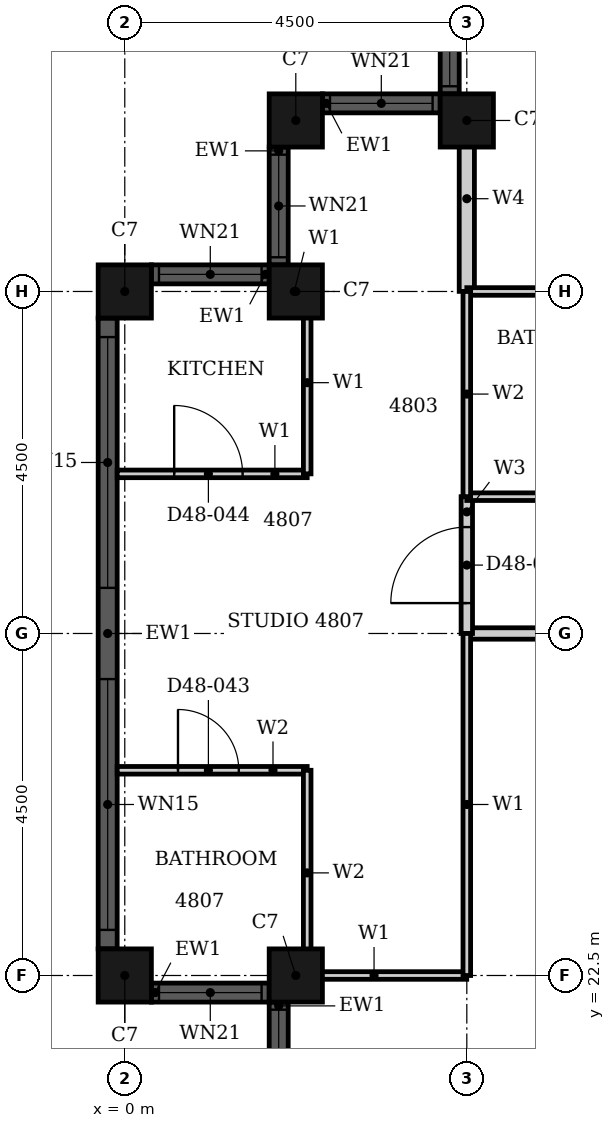
"""IFC4 building model, lengths in metres.
Left out: names, types, materials, properties, quantities, classifications, styles, units other than length and angle.
Written with IfcOpenShell. Run it as: python <this file> out.ifc"""

import sys

from ifc_helpers import new_model, si_unit, direction, frame, frame_2d, origin, origin_2d, place, context, subcontext, project, spatial, rectangle, hollow_rectangle, extrude, element, fill, save


model = new_model("IFC4")
c1 = context("Model", 3, precision=1e-05, world=origin(), true_north=direction((0.0, 1.0)))
c2 = subcontext(c1, "Body", "Model", "MODEL_VIEW")
j1 = project(units=[si_unit("LENGTHUNIT", "METRE"), si_unit("PLANEANGLEUNIT", "RADIAN")], contexts=[c1])
p1 = place(None, origin())
s1 = spatial("IfcSite", under=j1, at=p1, CompositionType="ELEMENT")
p2 = place(p1, origin())
s2 = spatial("IfcBuilding", under=s1, at=p2, CompositionType="ELEMENT")
p3 = place(p2, frame((0.0, 0.0, 192.4)))
s3 = spatial("IfcBuildingStorey", under=s2, at=p3, CompositionType="ELEMENT", Elevation=192.4)
for number, where, z_axis, x_axis in (
    (1, (4.5, 33.75, 0.0), (0.0, 0.0, 1.0), (1.0, 0.0, 0.0)),
    (2, (2.25, 33.75, 0.0), (0.0, 0.0, 1.0), (1.0, 0.0, 0.0)),
    (3, (2.25, 31.5, 0.0), (0.0, 0.0, 1.0), (1.0, 0.0, 0.0)),
    (4, (0.0, 31.5, 0.0), (0.0, 0.0, 1.0), (1.0, 0.0, 0.0)),
    (5, (0.0, 22.5, 0.0), (0.0, 0.0, 1.0), (1.0, 0.0, 0.0)),
    (6, (2.25, 22.5, 0.0), (0.0, 0.0, 1.0), (1.0, 0.0, 0.0)),
):
    element("IfcColumn", number, at=place(p3, frame(where, z_axis=z_axis, x_axis=x_axis)), inside=s3, PredefinedType="COLUMN", context=c2, shape_type="SweptSolid", body=[
        extrude(hollow_rectangle(XDim=0.7, YDim=0.7, WallThickness=0.022, at=origin_2d()), origin(), (0.0, 0.0, 1.0), 3.7),
    ])
p4 = place(p3, frame((4.275, 35.65, 0.0), z_axis=(0.0, 0.0, 1.0), x_axis=(0.0, -1.0, 0.0)))
e7 = element("IfcWall", 7, at=p4, inside=s3, PredefinedType="SOLIDWALL", context=c2, shape_type="SweptSolid", body=[
    extrude(rectangle(XDim=1.55, YDim=0.25, at=frame_2d((0.775, 0.0))), origin(), (0.0, 0.0, 1.0), 3.7),
])
p5 = place(p4, frame((0.1, 0.0, 0.9)))
e8 = element("IfcOpeningElement", 8, at=p5, cuts=e7, PredefinedType="OPENING", context=c2, shape_type="SweptSolid", body=[
    extrude(rectangle(XDim=1.35, YDim=1.85, at=frame_2d((0.675, 0.925))), frame((0.0, 0.135, 0.0), z_axis=(0.0, -1.0, 0.0), x_axis=(1.0, 0.0, 0.0)), (0.0, 0.0, 1.0), 0.27),
])
p6 = place(p3, frame((4.15, 33.975, 0.0), z_axis=(0.0, 0.0, 1.0), x_axis=(-1.0, 0.0, 0.0)))
e9 = element("IfcWall", 9, at=p6, inside=s3, PredefinedType="SOLIDWALL", context=c2, shape_type="SweptSolid", body=[
    extrude(rectangle(XDim=1.55, YDim=0.25, at=frame_2d((0.775, 0.0))), origin(), (0.0, 0.0, 1.0), 3.7),
])
p7 = place(p6, frame((0.1, 0.0, 0.9)))
e10 = element("IfcOpeningElement", 10, at=p7, cuts=e9, PredefinedType="OPENING", context=c2, shape_type="SweptSolid", body=[
    extrude(rectangle(XDim=1.35, YDim=1.85, at=frame_2d((0.675, 0.925))), frame((0.0, 0.135, 0.0), z_axis=(0.0, -1.0, 0.0), x_axis=(1.0, 0.0, 0.0)), (0.0, 0.0, 1.0), 0.27),
])
p8 = place(p3, frame((2.025, 33.4, 0.0), z_axis=(0.0, 0.0, 1.0), x_axis=(0.0, -1.0, 0.0)))
e11 = element("IfcWall", 11, at=p8, inside=s3, PredefinedType="SOLIDWALL", context=c2, shape_type="SweptSolid", body=[
    extrude(rectangle(XDim=1.55, YDim=0.25, at=frame_2d((0.775, 0.0))), origin(), (0.0, 0.0, 1.0), 3.7),
])
p9 = place(p8, frame((0.1, 0.0, 0.9)))
e12 = element("IfcOpeningElement", 12, at=p9, cuts=e11, PredefinedType="OPENING", context=c2, shape_type="SweptSolid", body=[
    extrude(rectangle(XDim=1.35, YDim=1.85, at=frame_2d((0.675, 0.925))), frame((0.0, 0.135, 0.0), z_axis=(0.0, -1.0, 0.0), x_axis=(1.0, 0.0, 0.0)), (0.0, 0.0, 1.0), 0.27),
])
p10 = place(p3, frame((1.9, 31.725, 0.0), z_axis=(0.0, 0.0, 1.0), x_axis=(-1.0, 0.0, 0.0)))
e13 = element("IfcWall", 13, at=p10, inside=s3, PredefinedType="SOLIDWALL", context=c2, shape_type="SweptSolid", body=[
    extrude(rectangle(XDim=1.55, YDim=0.25, at=frame_2d((0.775, 0.0))), origin(), (0.0, 0.0, 1.0), 3.7),
])
p11 = place(p10, frame((0.1, 0.0, 0.9)))
e14 = element("IfcOpeningElement", 14, at=p11, cuts=e13, PredefinedType="OPENING", context=c2, shape_type="SweptSolid", body=[
    extrude(rectangle(XDim=1.35, YDim=1.85, at=frame_2d((0.675, 0.925))), frame((0.0, 0.135, 0.0), z_axis=(0.0, -1.0, 0.0), x_axis=(1.0, 0.0, 0.0)), (0.0, 0.0, 1.0), 0.27),
])
p12 = place(p3, frame((-0.225, 31.15, 0.0), z_axis=(0.0, 0.0, 1.0), x_axis=(0.0, -1.0, 0.0)))
e15 = element("IfcWall", 15, at=p12, inside=s3, PredefinedType="SOLIDWALL", context=c2, shape_type="SweptSolid", body=[
    extrude(rectangle(XDim=8.3, YDim=0.25, at=frame_2d((4.15, 0.0))), origin(), (0.0, 0.0, 1.0), 3.7),
])
p13 = place(p12, frame((0.25, 0.0, 0.45)))
e16 = element("IfcOpeningElement", 16, at=p13, cuts=e15, PredefinedType="OPENING", context=c2, shape_type="SweptSolid", body=[
    extrude(rectangle(XDim=3.3, YDim=2.3, at=frame_2d((1.65, 1.15))), frame((0.0, 0.135, 0.0), z_axis=(0.0, -1.0, 0.0), x_axis=(1.0, 0.0, 0.0)), (0.0, 0.0, 1.0), 0.27),
])
p14 = place(p12, frame((4.75, 0.0, 0.45)))
e17 = element("IfcOpeningElement", 17, at=p14, cuts=e15, PredefinedType="OPENING", context=c2, shape_type="SweptSolid", body=[
    extrude(rectangle(XDim=3.3, YDim=2.3, at=frame_2d((1.65, 1.15))), frame((0.0, 0.135, 0.0), z_axis=(0.0, -1.0, 0.0), x_axis=(1.0, 0.0, 0.0)), (0.0, 0.0, 1.0), 0.27),
])
p15 = place(p3, frame((0.35, 22.275, 0.0), z_axis=(0.0, 0.0, 1.0), x_axis=(1.0, 0.0, 0.0)))
e18 = element("IfcWall", 18, at=p15, inside=s3, PredefinedType="SOLIDWALL", context=c2, shape_type="SweptSolid", body=[
    extrude(rectangle(XDim=1.55, YDim=0.25, at=frame_2d((0.775, 0.0))), origin(), (0.0, 0.0, 1.0), 3.7),
])
p16 = place(p15, frame((0.1, 0.0, 0.9)))
e19 = element("IfcOpeningElement", 19, at=p16, cuts=e18, PredefinedType="OPENING", context=c2, shape_type="SweptSolid", body=[
    extrude(rectangle(XDim=1.35, YDim=1.85, at=frame_2d((0.675, 0.925))), frame((0.0, 0.135, 0.0), z_axis=(0.0, -1.0, 0.0), x_axis=(1.0, 0.0, 0.0)), (0.0, 0.0, 1.0), 0.27),
])
p17 = place(p3, frame((2.025, 22.15, 0.0), z_axis=(0.0, 0.0, 1.0), x_axis=(0.0, -1.0, 0.0)))
e20 = element("IfcWall", 20, at=p17, inside=s3, PredefinedType="SOLIDWALL", context=c2, shape_type="SweptSolid", body=[
    extrude(rectangle(XDim=1.55, YDim=0.25, at=frame_2d((0.775, 0.0))), origin(), (0.0, 0.0, 1.0), 3.7),
])
p18 = place(p17, frame((0.1, 0.0, 0.9)))
e21 = element("IfcOpeningElement", 21, at=p18, cuts=e20, PredefinedType="OPENING", context=c2, shape_type="SweptSolid", body=[
    extrude(rectangle(XDim=1.35, YDim=1.85, at=frame_2d((0.675, 0.925))), frame((0.0, 0.135, 0.0), z_axis=(0.0, -1.0, 0.0), x_axis=(1.0, 0.0, 0.0)), (0.0, 0.0, 1.0), 0.27),
])
p19 = place(p3, frame((4.5, 27.0, 0.0), z_axis=(0.0, 0.0, 1.0), x_axis=(1.0, 0.0, 0.0)))
e22 = element("IfcWall", 22, at=p19, inside=s3, PredefinedType="PARTITIONING", context=c2, shape_type="SweptSolid", body=[
    extrude(rectangle(XDim=13.5, YDim=0.15, at=frame_2d((6.75, 0.0))), origin(), (0.0, 0.0, 1.0), 2.68),
])
p20 = place(p19, frame((5.35, 0.0, 0.0)))
e23 = element("IfcOpeningElement", 23, at=p20, cuts=e22, PredefinedType="OPENING", context=c2, shape_type="SweptSolid", body=[
    extrude(rectangle(XDim=1.0, YDim=2.1, at=frame_2d((0.5, 1.05))), frame((0.0, 0.085, 0.0), z_axis=(0.0, -1.0, 0.0), x_axis=(1.0, 0.0, 0.0)), (0.0, 0.0, 1.0), 0.17),
])
p21 = place(p3, frame((4.5, 27.0, 0.0), z_axis=(0.0, 0.0, 1.0), x_axis=(0.0, 1.0, 0.0)))
e24 = element("IfcWall", 24, at=p21, inside=s3, PredefinedType="PARTITIONING", context=c2, shape_type="SweptSolid", body=[
    extrude(rectangle(XDim=1.8, YDim=0.15, at=frame_2d((0.9, 0.0))), origin(), (0.0, 0.0, 1.0), 3.4),
])
p22 = place(p21, frame((0.4, 0.0, 0.0)))
e25 = element("IfcOpeningElement", 25, at=p22, cuts=e24, PredefinedType="OPENING", context=c2, shape_type="SweptSolid", body=[
    extrude(rectangle(XDim=1.0, YDim=2.2, at=frame_2d((0.5, 1.1))), frame((0.0, 0.085, 0.0), z_axis=(0.0, -1.0, 0.0), x_axis=(1.0, 0.0, 0.0)), (0.0, 0.0, 1.0), 0.17),
])
p23 = place(p3, frame((2.06, 22.5, 0.0), z_axis=(0.0, 0.0, 1.0), x_axis=(1.0, 0.0, 0.0)))
e26 = element("IfcWall", 26, at=p23, inside=s3, PredefinedType="PARTITIONING", context=c2, shape_type="SweptSolid", body=[
    extrude(rectangle(XDim=2.439, YDim=0.1, at=frame_2d((1.219, 0.0))), origin(), (0.0, 0.0, 1.0), 2.68),
])
p24 = place(p3, frame((-0.1, 29.1, 0.0), z_axis=(0.0, 0.0, 1.0), x_axis=(1.0, 0.0, 0.0)))
e27 = element("IfcWall", 27, at=p24, inside=s3, PredefinedType="PARTITIONING", context=c2, shape_type="SweptSolid", body=[
    extrude(rectangle(XDim=2.5, YDim=0.1, at=frame_2d((1.25, 0.0))), origin(), (0.0, 0.0, 1.0), 3.4),
])
p25 = place(p24, frame((0.75, 0.0, 0.0)))
e28 = element("IfcOpeningElement", 28, at=p25, cuts=e27, PredefinedType="OPENING", context=c2, shape_type="SweptSolid", body=[
    extrude(rectangle(XDim=0.9, YDim=2.1, at=frame_2d((0.45, 1.05))), frame((0.0, 0.06, 0.0), z_axis=(0.0, -1.0, 0.0), x_axis=(1.0, 0.0, 0.0)), (0.0, 0.0, 1.0), 0.12),
])
p26 = place(p3, frame((2.06, 31.5, 0.0), z_axis=(0.0, 0.0, 1.0), x_axis=(1.0, 0.0, 0.0)))
e29 = element("IfcWall", 29, at=p26, inside=s3, PredefinedType="PARTITIONING", context=c2, shape_type="SweptSolid", body=[
    extrude(rectangle(XDim=0.34, YDim=0.1, at=frame_2d((0.17, 0.0))), origin(), (0.0, 0.0, 1.0), 3.4),
])
p27 = place(p3, frame((2.4, 29.1, 0.0), z_axis=(0.0, 0.0, 1.0), x_axis=(0.0, 1.0, 0.0)))
e30 = element("IfcWall", 30, at=p27, inside=s3, PredefinedType="PARTITIONING", context=c2, shape_type="SweptSolid", body=[
    extrude(rectangle(XDim=2.4, YDim=0.1, at=frame_2d((1.2, 0.0))), origin(), (0.0, 0.0, 1.0), 3.4),
])
p28 = place(p3, frame((4.5, 22.5, 0.0), z_axis=(0.0, 0.0, 1.0), x_axis=(0.0, 1.0, 0.0)))
e31 = element("IfcWall", 31, at=p28, inside=s3, PredefinedType="PARTITIONING", context=c2, shape_type="SweptSolid", body=[
    extrude(rectangle(XDim=4.5, YDim=0.1, at=frame_2d((2.25, 0.0))), origin(), (0.0, 0.0, 1.0), 3.4),
])
p29 = place(p3, frame((4.5, 31.501, 0.0), z_axis=(0.0, 0.0, 1.0), x_axis=(0.0, 1.0, 0.0)))
e32 = element("IfcWall", 32, at=p29, inside=s3, PredefinedType="PARTITIONING", context=c2, shape_type="SweptSolid", body=[
    extrude(rectangle(XDim=2.439, YDim=0.2, at=frame_2d((1.219, 0.0))), origin(), (0.0, 0.0, 1.0), 3.4),
])
p30 = place(p3, frame((-0.1, 25.2, 0.0), z_axis=(0.0, 0.0, 1.0), x_axis=(1.0, 0.0, 0.0)))
e33 = element("IfcWall", 33, at=p30, inside=s3, PredefinedType="PARTITIONING", context=c2, shape_type="SweptSolid", body=[
    extrude(rectangle(XDim=2.5, YDim=0.1, at=frame_2d((1.25, 0.0))), origin(), (0.0, 0.0, 1.0), 3.4),
])
p31 = place(p30, frame((0.8, 0.0, 0.0)))
e34 = element("IfcOpeningElement", 34, at=p31, cuts=e33, PredefinedType="OPENING", context=c2, shape_type="SweptSolid", body=[
    extrude(rectangle(XDim=0.8, YDim=2.1, at=frame_2d((0.4, 1.05))), frame((0.0, 0.06, 0.0), z_axis=(0.0, -1.0, 0.0), x_axis=(1.0, 0.0, 0.0)), (0.0, 0.0, 1.0), 0.12),
])
p32 = place(p3, frame((4.5, 28.8, 0.0), z_axis=(0.0, 0.0, 1.0), x_axis=(1.0, 0.0, 0.0)))
e35 = element("IfcWall", 35, at=p32, inside=s3, PredefinedType="PARTITIONING", context=c2, shape_type="SweptSolid", body=[
    extrude(rectangle(XDim=2.4, YDim=0.1, at=frame_2d((1.2, 0.0))), origin(), (0.0, 0.0, 1.0), 3.4),
])
p33 = place(p3, frame((4.5, 31.5, 0.0), z_axis=(0.0, 0.0, 1.0), x_axis=(1.0, 0.0, 0.0)))
e36 = element("IfcWall", 36, at=p33, inside=s3, PredefinedType="PARTITIONING", context=c2, shape_type="SweptSolid", body=[
    extrude(rectangle(XDim=2.4, YDim=0.1, at=frame_2d((1.2, 0.0))), origin(), (0.0, 0.0, 1.0), 2.68),
])
for number, where, z_axis, x_axis in (
    (37, (2.4, 22.5, 0.0), (0.0, 0.0, 1.0), (0.0, 1.0, 0.0)),
    (38, (4.5, 28.8, 0.0), (0.0, 0.0, 1.0), (0.0, 1.0, 0.0)),
):
    element("IfcWall", number, at=place(p3, frame(where, z_axis=z_axis, x_axis=x_axis)), inside=s3, PredefinedType="PARTITIONING", context=c2, shape_type="SweptSolid", body=[
        extrude(rectangle(XDim=2.7, YDim=0.1, at=frame_2d((1.35, 0.0))), origin(), (0.0, 0.0, 1.0), 3.4),
    ])
p34 = place(p5, origin())
e39 = element("IfcWindow", 39, at=p34, inside=s3, PartitioningType="SINGLE_PANEL", PredefinedType="WINDOW", context=c2, shape_type="SweptSolid", body=[
    extrude(rectangle(XDim=1.35, YDim=1.85, at=frame_2d((0.675, 0.925))), frame((0.0, 0.03, 0.0), z_axis=(0.0, -1.0, 0.0), x_axis=(1.0, 0.0, 0.0)), (0.0, 0.0, 1.0), 0.06),
])
fill(e8, e39)
p35 = place(p7, origin())
e40 = element("IfcWindow", 40, at=p35, inside=s3, PartitioningType="SINGLE_PANEL", PredefinedType="WINDOW", context=c2, shape_type="SweptSolid", body=[
    extrude(rectangle(XDim=1.35, YDim=1.85, at=frame_2d((0.675, 0.925))), frame((0.0, 0.03, 0.0), z_axis=(0.0, -1.0, 0.0), x_axis=(1.0, 0.0, 0.0)), (0.0, 0.0, 1.0), 0.06),
])
fill(e10, e40)
p36 = place(p9, origin())
e41 = element("IfcWindow", 41, at=p36, inside=s3, PartitioningType="SINGLE_PANEL", PredefinedType="WINDOW", context=c2, shape_type="SweptSolid", body=[
    extrude(rectangle(XDim=1.35, YDim=1.85, at=frame_2d((0.675, 0.925))), frame((0.0, 0.03, 0.0), z_axis=(0.0, -1.0, 0.0), x_axis=(1.0, 0.0, 0.0)), (0.0, 0.0, 1.0), 0.06),
])
fill(e12, e41)
p37 = place(p11, origin())
e42 = element("IfcWindow", 42, at=p37, inside=s3, PartitioningType="SINGLE_PANEL", PredefinedType="WINDOW", context=c2, shape_type="SweptSolid", body=[
    extrude(rectangle(XDim=1.35, YDim=1.85, at=frame_2d((0.675, 0.925))), frame((0.0, 0.03, 0.0), z_axis=(0.0, -1.0, 0.0), x_axis=(1.0, 0.0, 0.0)), (0.0, 0.0, 1.0), 0.06),
])
fill(e14, e42)
p38 = place(p13, origin())
e43 = element("IfcWindow", 43, at=p38, inside=s3, PartitioningType="SINGLE_PANEL", PredefinedType="WINDOW", context=c2, shape_type="SweptSolid", body=[
    extrude(rectangle(XDim=3.3, YDim=2.3, at=frame_2d((1.65, 1.15))), frame((0.0, 0.03, 0.0), z_axis=(0.0, -1.0, 0.0), x_axis=(1.0, 0.0, 0.0)), (0.0, 0.0, 1.0), 0.06),
])
fill(e16, e43)
p39 = place(p14, origin())
e44 = element("IfcWindow", 44, at=p39, inside=s3, PartitioningType="SINGLE_PANEL", PredefinedType="WINDOW", context=c2, shape_type="SweptSolid", body=[
    extrude(rectangle(XDim=3.3, YDim=2.3, at=frame_2d((1.65, 1.15))), frame((0.0, 0.03, 0.0), z_axis=(0.0, -1.0, 0.0), x_axis=(1.0, 0.0, 0.0)), (0.0, 0.0, 1.0), 0.06),
])
fill(e17, e44)
p40 = place(p16, origin())
e45 = element("IfcWindow", 45, at=p40, inside=s3, PartitioningType="SINGLE_PANEL", PredefinedType="WINDOW", context=c2, shape_type="SweptSolid", body=[
    extrude(rectangle(XDim=1.35, YDim=1.85, at=frame_2d((0.675, 0.925))), frame((0.0, 0.03, 0.0), z_axis=(0.0, -1.0, 0.0), x_axis=(1.0, 0.0, 0.0)), (0.0, 0.0, 1.0), 0.06),
])
fill(e19, e45)
p41 = place(p18, origin())
e46 = element("IfcWindow", 46, at=p41, inside=s3, PartitioningType="SINGLE_PANEL", PredefinedType="WINDOW", context=c2, shape_type="SweptSolid", body=[
    extrude(rectangle(XDim=1.35, YDim=1.85, at=frame_2d((0.675, 0.925))), frame((0.0, 0.03, 0.0), z_axis=(0.0, -1.0, 0.0), x_axis=(1.0, 0.0, 0.0)), (0.0, 0.0, 1.0), 0.06),
])
fill(e21, e46)
p42 = place(p22, origin())
e47 = element("IfcDoor", 47, at=p42, inside=s3, OperationType="SINGLE_SWING_LEFT", PredefinedType="DOOR", context=c2, shape_type="SweptSolid", body=[
    extrude(rectangle(XDim=1.0, YDim=2.2, at=frame_2d((0.5, 1.1))), frame((0.0, 0.025, 0.0), z_axis=(0.0, -1.0, 0.0), x_axis=(1.0, 0.0, 0.0)), (0.0, 0.0, 1.0), 0.05),
])
fill(e25, e47)
p43 = place(p31, origin())
e48 = element("IfcDoor", 48, at=p43, inside=s3, OperationType="SINGLE_SWING_LEFT", PredefinedType="DOOR", context=c2, shape_type="SweptSolid", body=[
    extrude(rectangle(XDim=0.8, YDim=2.1, at=frame_2d((0.4, 1.05))), frame((0.0, 0.025, 0.0), z_axis=(0.0, -1.0, 0.0), x_axis=(1.0, 0.0, 0.0)), (0.0, 0.0, 1.0), 0.05),
])
fill(e34, e48)
p44 = place(p25, origin())
e49 = element("IfcDoor", 49, at=p44, inside=s3, OperationType="SINGLE_SWING_RIGHT", PredefinedType="DOOR", context=c2, shape_type="SweptSolid", body=[
    extrude(rectangle(XDim=0.9, YDim=2.1, at=frame_2d((0.45, 1.05))), frame((0.0, 0.025, 0.0), z_axis=(0.0, -1.0, 0.0), x_axis=(1.0, 0.0, 0.0)), (0.0, 0.0, 1.0), 0.05),
])
fill(e28, e49)
save(model, sys.argv[1])
